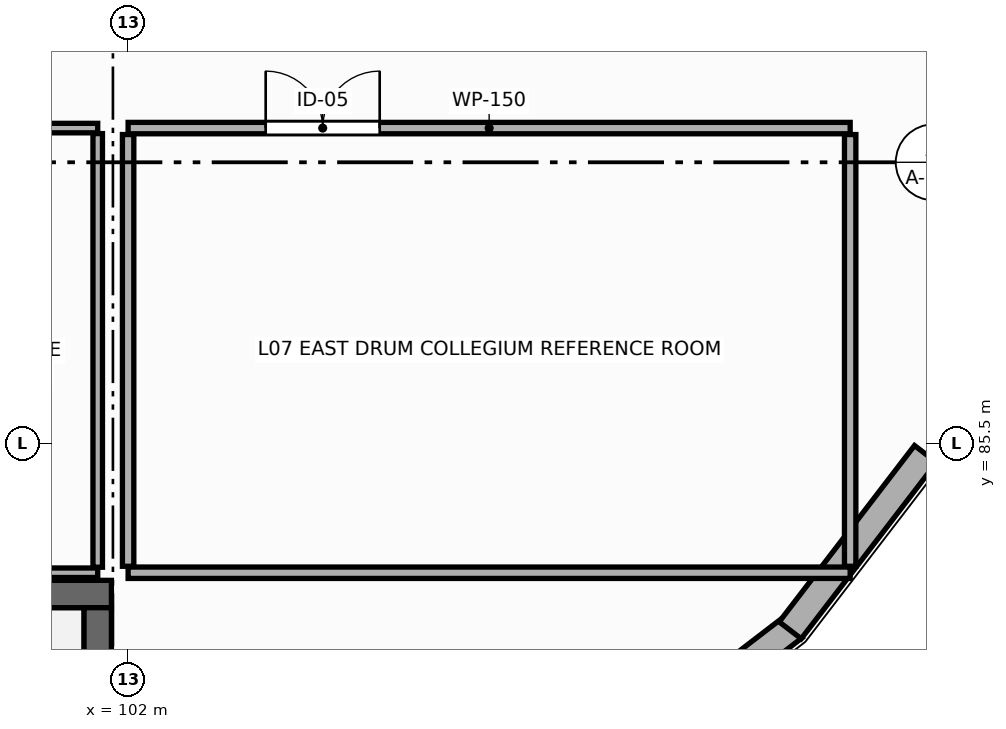
"""IFC4 building model, lengths in metres.
Left out: names, types, materials, properties, quantities, classifications, styles, units other than length and angle.
Written with IfcOpenShell. Run it as: python <this file> out.ifc"""

import sys

from ifc_helpers import new_model, si_unit, direction, frame, frame_2d, origin, place, context, subcontext, project, spatial, rectangle, extrude, element, fill, save


model = new_model("IFC4")
c1 = context("Model", 3, precision=1e-05, world=origin(), true_north=direction((0.0, 1.0)))
c2 = subcontext(c1, "Body", "Model", "MODEL_VIEW")
j1 = project(units=[si_unit("LENGTHUNIT", "METRE"), si_unit("PLANEANGLEUNIT", "RADIAN")], contexts=[c1])
p1 = place(None, origin())
s1 = spatial("IfcSite", under=j1, at=p1, CompositionType="ELEMENT")
p2 = place(p1, origin())
s2 = spatial("IfcBuilding", under=s1, at=p2, CompositionType="ELEMENT")
p3 = place(p2, frame((0.0, 0.0, 27.0)))
s3 = spatial("IfcBuildingStorey", under=s2, at=p3, CompositionType="ELEMENT", Elevation=27.0)
p4 = place(p3, frame((108.438, 81.309, 0.0), z_axis=(0.0, 0.0, 1.0), x_axis=(0.793318703663, 0.608806565682, 0.0)))
e1 = element("IfcWall", 1, at=p4, inside=s3, PredefinedType="ELEMENTEDWALL", context=c2, shape_type="SweptSolid", body=[
    extrude(rectangle(XDim=2.924, YDim=0.365, at=frame_2d((1.462, 0.0))), origin(), (0.0, 0.0, 1.0), 3.01),
])
p5 = place(p4, frame((1.062, 0.0, 0.85)))
e2 = element("IfcOpeningElement", 2, at=p5, cuts=e1, PredefinedType="OPENING", context=c2, shape_type="SweptSolid", body=[
    extrude(rectangle(XDim=0.8, YDim=1.7, at=frame_2d((0.4, 0.85))), frame((0.0, 0.192, 0.0), z_axis=(0.0, -1.0, 0.0), x_axis=(1.0, 0.0, 0.0)), (0.0, 0.0, 1.0), 0.385),
])
p6 = place(p3, frame((110.711, 83.042, 0.0), z_axis=(0.0, 0.0, 1.0), x_axis=(0.60876624393, 0.793349645649, 0.0)))
e3 = element("IfcWall", 3, at=p6, inside=s3, PredefinedType="ELEMENTEDWALL", context=c2, shape_type="SweptSolid", body=[
    extrude(rectangle(XDim=2.924, YDim=0.365, at=frame_2d((1.462, 0.0))), origin(), (0.0, 0.0, 1.0), 3.11),
])
p7 = place(p3, frame((92.42, 83.52, 0.0), z_axis=(0.0, 0.0, 1.0), x_axis=(1.0, 0.0, 0.0)))
e4 = element("IfcWall", 4, at=p7, inside=s3, PredefinedType="SHEAR", context=c2, shape_type="SweptSolid", body=[
    extrude(rectangle(XDim=9.36, YDim=0.36, at=frame_2d((4.68, 0.0))), origin(), (0.0, 0.0, 1.0), 3.98),
])
p8 = place(p3, frame((101.6, 83.34, 0.0), z_axis=(0.0, 0.0, 1.0), x_axis=(0.0, -1.0, 0.0)))
e5 = element("IfcWall", 5, at=p8, inside=s3, PredefinedType="SHEAR", context=c2, shape_type="SweptSolid", body=[
    extrude(rectangle(XDim=3.36, YDim=0.36, at=frame_2d((1.68, 0.0))), origin(), (0.0, 0.0, 1.0), 3.98),
])
p9 = place(p3, frame((99.1, 89.65, 0.0), z_axis=(0.0, 0.0, 1.0), x_axis=(1.0, 0.0, 0.0)))
e6 = element("IfcWall", 6, at=p9, inside=s3, PredefinedType="PARTITIONING", context=c2, shape_type="SweptSolid", body=[
    extrude(rectangle(XDim=2.5, YDim=0.125, at=frame_2d((1.25, 0.0))), origin(), (0.0, 0.0, 1.0), 3.11),
])
p10 = place(p9, frame((0.75, 0.0, 0.0)))
e7 = element("IfcOpeningElement", 7, at=p10, cuts=e6, PredefinedType="OPENING", context=c2, shape_type="SweptSolid", body=[
    extrude(rectangle(XDim=1.0, YDim=2.1, at=frame_2d((0.5, 1.05))), frame((0.0, 0.073, 0.0), z_axis=(0.0, -1.0, 0.0), x_axis=(1.0, 0.0, 0.0)), (0.0, 0.0, 1.0), 0.145),
])
p11 = place(p3, frame((101.6, 83.8, 0.0), z_axis=(0.0, 0.0, 1.0), x_axis=(-1.0, 0.0, 0.0)))
e8 = element("IfcWall", 8, at=p11, inside=s3, PredefinedType="PARTITIONING", context=c2, shape_type="SweptSolid", body=[
    extrude(rectangle(XDim=2.5, YDim=0.125, at=frame_2d((1.25, 0.0))), origin(), (0.0, 0.0, 1.0), 3.11),
])
p12 = place(p3, frame((101.6, 89.577, 0.0), z_axis=(0.0, 0.0, 1.0), x_axis=(0.0, -1.0, 0.0)))
e9 = element("IfcWall", 9, at=p12, inside=s3, PredefinedType="PARTITIONING", context=c2, shape_type="SweptSolid", body=[
    extrude(rectangle(XDim=5.705, YDim=0.125, at=frame_2d((2.853, 0.0))), origin(), (0.0, 0.0, 1.0), 3.11),
])
p13 = place(p3, frame((102.0, 89.65, 0.0), z_axis=(0.0, 0.0, 1.0), x_axis=(1.0, 0.0, 0.0)))
e10 = element("IfcWall", 10, at=p13, inside=s3, PredefinedType="PARTITIONING", context=c2, shape_type="SweptSolid", body=[
    extrude(rectangle(XDim=9.5, YDim=0.15, at=frame_2d((4.75, 0.0))), origin(), (0.0, 0.0, 1.0), 3.01),
])
p14 = place(p13, frame((1.81, 0.0, 0.0)))
e11 = element("IfcOpeningElement", 11, at=p14, cuts=e10, PredefinedType="OPENING", context=c2, shape_type="SweptSolid", body=[
    extrude(rectangle(XDim=1.5, YDim=2.35, at=frame_2d((0.75, 1.175))), frame((0.0, 0.085, 0.0), z_axis=(0.0, -1.0, 0.0), x_axis=(1.0, 0.0, 0.0)), (0.0, 0.0, 1.0), 0.17),
])
p15 = place(p3, frame((111.5, 83.8, 0.0), z_axis=(0.0, 0.0, 1.0), x_axis=(-1.0, 0.0, 0.0)))
e12 = element("IfcWall", 12, at=p15, inside=s3, PredefinedType="PARTITIONING", context=c2, shape_type="SweptSolid", body=[
    extrude(rectangle(XDim=9.5, YDim=0.15, at=frame_2d((4.75, 0.0))), origin(), (0.0, 0.0, 1.0), 3.01),
])
p16 = place(p3, frame((102.0, 83.885, 0.0), z_axis=(0.0, 0.0, 1.0), x_axis=(0.0, 1.0, 0.0)))
e13 = element("IfcWall", 13, at=p16, inside=s3, PredefinedType="PARTITIONING", context=c2, shape_type="SweptSolid", body=[
    extrude(rectangle(XDim=5.68, YDim=0.15, at=frame_2d((2.84, 0.0))), origin(), (0.0, 0.0, 1.0), 3.11),
])
p17 = place(p3, frame((111.5, 89.565, 0.0), z_axis=(0.0, 0.0, 1.0), x_axis=(0.0, -1.0, 0.0)))
e14 = element("IfcWall", 14, at=p17, inside=s3, PredefinedType="PARTITIONING", context=c2, shape_type="SweptSolid", body=[
    extrude(rectangle(XDim=5.68, YDim=0.15, at=frame_2d((2.84, 0.0))), origin(), (0.0, 0.0, 1.0), 3.61),
])
p18 = place(p14, origin())
e15 = element("IfcDoor", 15, at=p18, inside=s3, OperationType="DOUBLE_DOOR_SINGLE_SWING", PredefinedType="DOOR", context=c2, shape_type="SweptSolid", body=[
    extrude(rectangle(XDim=1.5, YDim=2.35, at=frame_2d((0.75, 1.175))), frame((0.0, 0.025, 0.0), z_axis=(0.0, -1.0, 0.0), x_axis=(1.0, 0.0, 0.0)), (0.0, 0.0, 1.0), 0.05),
])
fill(e11, e15)
save(model, sys.argv[1])
